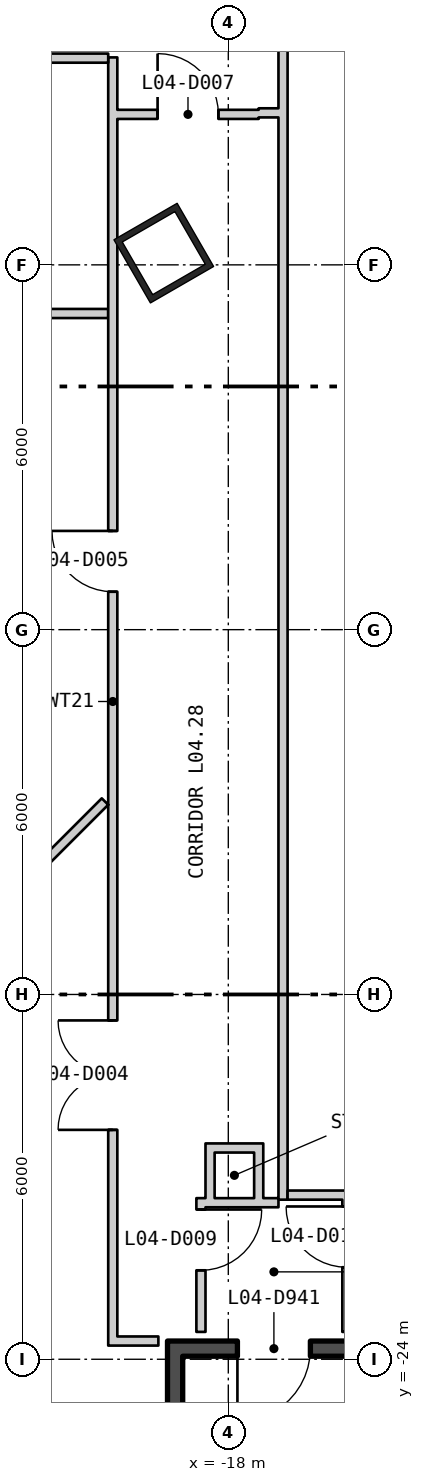
"""IFC4 building model, lengths in metres.
Left out: names, types, materials, properties, quantities, classifications, styles, units other than length and angle.
Written with IfcOpenShell. Run it as: python <this file> out.ifc"""

import sys

from ifc_helpers import new_model, si_unit, direction, frame, frame_2d, origin, origin_2d, place, context, subcontext, project, spatial, rectangle, hollow_rectangle, extrude, element, fill, save


model = new_model("IFC4")
c1 = context("Model", 3, precision=1e-05, world=origin(), true_north=direction((0.0, 1.0)))
c2 = subcontext(c1, "Body", "Model", "MODEL_VIEW")
j1 = project(units=[si_unit("LENGTHUNIT", "METRE"), si_unit("PLANEANGLEUNIT", "RADIAN")], contexts=[c1])
p1 = place(None, origin())
s1 = spatial("IfcSite", under=j1, at=p1, CompositionType="ELEMENT")
p2 = place(p1, origin())
s2 = spatial("IfcBuilding", under=s1, at=p2, CompositionType="ELEMENT")
p3 = place(p2, frame((0.0, 0.0, 23.7)))
s3 = spatial("IfcBuildingStorey", under=s2, at=p3, CompositionType="ELEMENT", Elevation=23.7)
p4 = place(p3, frame((-19.061, -5.807, 0.0), z_axis=(0.0, 0.0, 1.0), x_axis=(0.5, -0.866025403784, 0.0)))
e1 = element("IfcColumn", 1, at=p4, inside=s3, PredefinedType="COLUMN", context=c2, shape_type="SweptSolid", body=[
    extrude(hollow_rectangle(XDim=1.2, YDim=1.2, WallThickness=0.1, at=origin_2d()), origin(), (0.0, 0.0, 1.0), 5.1),
])
p5 = place(p3, frame((-18.875, -31.25, 0.0), z_axis=(0.0, 0.0, 1.0), x_axis=(0.0, 1.0, 0.0)))
e2 = element("IfcWall", 2, at=p5, inside=s3, PredefinedType="SHEAR", context=c2, shape_type="SweptSolid", body=[
    extrude(rectangle(XDim=7.3, YDim=0.25, at=frame_2d((3.65, 0.0))), origin(), (0.0, 0.0, 1.0), 4.85),
])
p6 = place(p3, frame((-19.0, -23.825, 0.0), z_axis=(0.0, 0.0, 1.0), x_axis=(1.0, 0.0, 0.0)))
e3 = element("IfcWall", 3, at=p6, inside=s3, PredefinedType="SHEAR", context=c2, shape_type="SweptSolid", body=[
    extrude(rectangle(XDim=3.5, YDim=0.25, at=frame_2d((1.75, 0.0))), origin(), (0.0, 0.0, 1.0), 4.85),
])
p7 = place(p6, frame((1.15, 0.0, 0.0)))
e4 = element("IfcOpeningElement", 4, at=p7, cuts=e3, PredefinedType="OPENING", context=c2, shape_type="SweptSolid", body=[
    extrude(rectangle(XDim=1.2, YDim=2.1, at=frame_2d((0.6, 1.05))), frame((0.0, 0.135, 0.0), z_axis=(0.0, -1.0, 0.0), x_axis=(1.0, 0.0, 0.0)), (0.0, 0.0, 1.0), 0.27),
])
p8 = place(p3, frame((-25.467, -6.8, 0.0), z_axis=(0.0, 0.0, 1.0), x_axis=(1.0, 0.0, 0.0)))
e5 = element("IfcWall", 5, at=p8, inside=s3, PredefinedType="PARTITIONING", context=c2, shape_type="SweptSolid", body=[
    extrude(rectangle(XDim=5.492, YDim=0.15, at=frame_2d((2.746, 0.0))), origin(), (0.0, 0.0, 1.0), 4.16),
])
p9 = place(p3, frame((-25.026, -19.825, 0.0), z_axis=(0.0, 0.0, 1.0), x_axis=(0.707106781187, 0.707106781187, 0.0)))
e6 = element("IfcWall", 6, at=p9, inside=s3, PredefinedType="PARTITIONING", context=c2, shape_type="SweptSolid", body=[
    extrude(rectangle(XDim=7.068, YDim=0.15, at=frame_2d((3.534, 0.0))), origin(), (0.0, 0.0, 1.0), 4.85),
])
p10 = place(p3, frame((-23.65, -2.6, 0.0), z_axis=(0.0, 0.0, 1.0), x_axis=(1.0, 0.0, 0.0)))
e7 = element("IfcWall", 7, at=p10, inside=s3, PredefinedType="PARTITIONING", context=c2, shape_type="SweptSolid", body=[
    extrude(rectangle(XDim=3.675, YDim=0.15, at=frame_2d((1.837, 0.0))), origin(), (0.0, 0.0, 1.0), 4.85),
])
p11 = place(p10, frame((1.312, 0.0, 0.0)))
e8 = element("IfcOpeningElement", 8, at=p11, cuts=e7, PredefinedType="OPENING", context=c2, shape_type="SweptSolid", body=[
    extrude(rectangle(XDim=1.0, YDim=2.1, at=frame_2d((0.5, 1.05))), frame((0.0, 0.085, 0.0), z_axis=(0.0, -1.0, 0.0), x_axis=(1.0, 0.0, 0.0)), (0.0, 0.0, 1.0), 0.17),
])
p12 = place(p3, frame((-19.9, -23.775, 0.0), z_axis=(0.0, 0.0, 1.0), x_axis=(0.0, 1.0, 0.0)))
e9 = element("IfcWall", 9, at=p12, inside=s3, PredefinedType="PARTITIONING", context=c2, shape_type="SweptSolid", body=[
    extrude(rectangle(XDim=21.187, YDim=0.15, at=frame_2d((10.594, 0.0))), origin(), (0.0, 0.0, 1.0), 4.85),
])
p13 = place(p12, frame((3.548, 0.0, 0.0)))
e10 = element("IfcOpeningElement", 10, at=p13, cuts=e9, PredefinedType="OPENING", context=c2, shape_type="SweptSolid", body=[
    extrude(rectangle(XDim=1.8, YDim=2.1, at=frame_2d((0.9, 1.05))), frame((0.0, 0.085, 0.0), z_axis=(0.0, -1.0, 0.0), x_axis=(1.0, 0.0, 0.0)), (0.0, 0.0, 1.0), 0.17),
])
p14 = place(p12, frame((12.399, 0.0, 0.0)))
e11 = element("IfcOpeningElement", 11, at=p14, cuts=e9, PredefinedType="OPENING", context=c2, shape_type="SweptSolid", body=[
    extrude(rectangle(XDim=1.0, YDim=2.1, at=frame_2d((0.5, 1.05))), frame((0.0, 0.085, 0.0), z_axis=(0.0, -1.0, 0.0), x_axis=(1.0, 0.0, 0.0)), (0.0, 0.0, 1.0), 0.17),
])
p15 = place(p3, frame((-19.825, -23.7, 0.0), z_axis=(0.0, 0.0, 1.0), x_axis=(1.0, 0.0, 0.0)))
e12 = element("IfcWall", 12, at=p15, inside=s3, PredefinedType="PARTITIONING", context=c2, shape_type="SweptSolid", body=[
    extrude(rectangle(XDim=0.675, YDim=0.15, at=frame_2d((0.338, 0.0))), origin(), (0.0, 0.0, 1.0), 4.85),
])
p16 = place(p3, frame((-19.825, -3.525, 0.0), z_axis=(0.0, 0.0, 1.0), x_axis=(1.0, 0.0, 0.0)))
e13 = element("IfcWall", 13, at=p16, inside=s3, PredefinedType="PARTITIONING", context=c2, shape_type="SweptSolid", body=[
    extrude(rectangle(XDim=2.325, YDim=0.15, at=frame_2d((1.163, 0.0))), origin(), (0.0, 0.0, 1.0), 4.85),
])
p17 = place(p16, frame((0.662, 0.0, 0.0)))
e14 = element("IfcOpeningElement", 14, at=p17, cuts=e13, PredefinedType="OPENING", context=c2, shape_type="SweptSolid", body=[
    extrude(rectangle(XDim=1.0, YDim=2.1, at=frame_2d((0.5, 1.05))), frame((0.0, 0.085, 0.0), z_axis=(0.0, -1.0, 0.0), x_axis=(1.0, 0.0, 0.0)), (0.0, 0.0, 1.0), 0.17),
])
p18 = place(p3, frame((-18.45, -23.55, 0.0), z_axis=(0.0, 0.0, 1.0), x_axis=(0.0, 1.0, 0.0)))
e15 = element("IfcWall", 15, at=p18, inside=s3, PredefinedType="PARTITIONING", context=c2, shape_type="SweptSolid", body=[
    extrude(rectangle(XDim=2.2, YDim=0.15, at=frame_2d((1.1, 0.0))), origin(), (0.0, 0.0, 1.0), 4.85),
])
p19 = place(p18, frame((1.013, 0.0, 0.0)))
e16 = element("IfcOpeningElement", 16, at=p19, cuts=e15, PredefinedType="OPENING", context=c2, shape_type="SweptSolid", body=[
    extrude(rectangle(XDim=1.0, YDim=2.1, at=frame_2d((0.5, 1.05))), frame((0.0, 0.085, 0.0), z_axis=(0.0, -1.0, 0.0), x_axis=(1.0, 0.0, 0.0)), (0.0, 0.0, 1.0), 0.17),
])
p20 = place(p3, frame((-18.3, -21.5, 0.0), z_axis=(0.0, 0.0, 1.0), x_axis=(0.0, 1.0, 0.0)))
e17 = element("IfcWall", 17, at=p20, inside=s3, PredefinedType="PARTITIONING", context=c2, shape_type="SweptSolid", body=[
    extrude(rectangle(XDim=1.05, YDim=0.15, at=frame_2d((0.525, 0.0))), origin(), (0.0, 0.0, 1.0), 4.85),
])
for number, where, z_axis, x_axis in (
    (18, (-18.225, -21.425, 0.0), (0.0, 0.0, 1.0), (1.0, 0.0, 0.0)),
    (19, (-18.225, -20.525, 0.0), (0.0, 0.0, 1.0), (1.0, 0.0, 0.0)),
):
    element("IfcWall", number, at=place(p3, frame(where, z_axis=z_axis, x_axis=x_axis)), inside=s3, PredefinedType="PARTITIONING", context=c2, shape_type="SweptSolid", body=[
        extrude(rectangle(XDim=0.65, YDim=0.15, at=frame_2d((0.325, 0.0))), origin(), (0.0, 0.0, 1.0), 4.85),
    ])
p21 = place(p3, frame((-17.5, -21.5, 0.0), z_axis=(0.0, 0.0, 1.0), x_axis=(0.0, 1.0, 0.0)))
e20 = element("IfcWall", 20, at=p21, inside=s3, PredefinedType="PARTITIONING", context=c2, shape_type="SweptSolid", body=[
    extrude(rectangle(XDim=1.05, YDim=0.15, at=frame_2d((0.525, 0.0))), origin(), (0.0, 0.0, 1.0), 4.85),
])
p22 = place(p3, frame((-17.5, -3.5, 0.0), z_axis=(0.0, 0.0, 1.0), x_axis=(1.0, 0.0, 0.0)))
e21 = element("IfcWall", 21, at=p22, inside=s3, PredefinedType="PARTITIONING", context=c2, shape_type="SweptSolid", body=[
    extrude(rectangle(XDim=0.325, YDim=0.15, at=frame_2d((0.163, 0.0))), origin(), (0.0, 0.0, 1.0), 4.85),
])
p23 = place(p3, frame((-17.425, -21.425, 0.0), z_axis=(0.0, 0.0, 1.0), x_axis=(1.0, 0.0, 0.0)))
e22 = element("IfcWall", 22, at=p23, inside=s3, PredefinedType="PARTITIONING", context=c2, shape_type="SweptSolid", body=[
    extrude(rectangle(XDim=0.25, YDim=0.15, at=frame_2d((0.125, 0.0))), origin(), (0.0, 0.0, 1.0), 4.85),
])
p24 = place(p3, frame((-17.1, -21.375, 0.0), z_axis=(0.0, 0.0, 1.0), x_axis=(0.0, 1.0, 0.0)))
e23 = element("IfcWall", 23, at=p24, inside=s3, PredefinedType="PARTITIONING", context=c2, shape_type="SweptSolid", body=[
    extrude(rectangle(XDim=19.05, YDim=0.15, at=frame_2d((9.525, 0.0))), origin(), (0.0, 0.0, 1.0), 4.85),
])
p25 = place(p3, frame((-17.025, -21.3, 0.0), z_axis=(0.0, 0.0, 1.0), x_axis=(1.0, 0.0, 0.0)))
e24 = element("IfcWall", 24, at=p25, inside=s3, PredefinedType="PARTITIONING", context=c2, shape_type="SweptSolid", body=[
    extrude(rectangle(XDim=10.654, YDim=0.15, at=frame_2d((5.327, 0.0))), origin(), (0.0, 0.0, 1.0), 4.85),
])
p26 = place(p3, frame((-16.05, -23.55, 0.0), z_axis=(0.0, 0.0, 1.0), x_axis=(0.0, 1.0, 0.0)))
e25 = element("IfcWall", 25, at=p26, inside=s3, PredefinedType="PARTITIONING", context=c2, shape_type="SweptSolid", body=[
    extrude(rectangle(XDim=2.175, YDim=0.15, at=frame_2d((1.087, 0.0))), origin(), (0.0, 0.0, 1.0), 4.16),
])
p27 = place(p26, frame((1.063, 0.0, 0.0)))
e26 = element("IfcOpeningElement", 26, at=p27, cuts=e25, PredefinedType="OPENING", context=c2, shape_type="SweptSolid", body=[
    extrude(rectangle(XDim=1.0, YDim=2.1, at=frame_2d((0.5, 1.05))), frame((0.0, 0.085, 0.0), z_axis=(0.0, -1.0, 0.0), x_axis=(1.0, 0.0, 0.0)), (0.0, 0.0, 1.0), 0.17),
])
p28 = place(p7, origin())
e27 = element("IfcDoor", 27, at=p28, inside=s3, OperationType="SINGLE_SWING_LEFT", PredefinedType="DOOR", context=c2, shape_type="SweptSolid", body=[
    extrude(rectangle(XDim=1.2, YDim=2.1, at=frame_2d((0.6, 1.05))), frame((0.0, 0.025, 0.0), z_axis=(0.0, -1.0, 0.0), x_axis=(1.0, 0.0, 0.0)), (0.0, 0.0, 1.0), 0.05),
])
fill(e4, e27)
p29 = place(p13, origin())
e28 = element("IfcDoor", 28, at=p29, inside=s3, OperationType="DOUBLE_DOOR_SINGLE_SWING", PredefinedType="DOOR", context=c2, shape_type="SweptSolid", body=[
    extrude(rectangle(XDim=1.8, YDim=2.1, at=frame_2d((0.9, 1.05))), frame((0.0, 0.025, 0.0), z_axis=(0.0, -1.0, 0.0), x_axis=(1.0, 0.0, 0.0)), (0.0, 0.0, 1.0), 0.05),
])
fill(e10, e28)
p30 = place(p14, origin())
e29 = element("IfcDoor", 29, at=p30, inside=s3, OperationType="SINGLE_SWING_LEFT", PredefinedType="DOOR", context=c2, shape_type="SweptSolid", body=[
    extrude(rectangle(XDim=1.0, YDim=2.1, at=frame_2d((0.5, 1.05))), frame((0.0, 0.025, 0.0), z_axis=(0.0, -1.0, 0.0), x_axis=(1.0, 0.0, 0.0)), (0.0, 0.0, 1.0), 0.05),
])
fill(e11, e29)
p31 = place(p17, origin())
e30 = element("IfcDoor", 30, at=p31, inside=s3, OperationType="SINGLE_SWING_RIGHT", PredefinedType="DOOR", context=c2, shape_type="SweptSolid", body=[
    extrude(rectangle(XDim=1.0, YDim=2.1, at=frame_2d((0.5, 1.05))), frame((0.0, 0.025, 0.0), z_axis=(0.0, -1.0, 0.0), x_axis=(1.0, 0.0, 0.0)), (0.0, 0.0, 1.0), 0.05),
])
fill(e14, e30)
p32 = place(p19, origin())
e31 = element("IfcDoor", 31, at=p32, inside=s3, OperationType="SINGLE_SWING_RIGHT", PredefinedType="DOOR", context=c2, shape_type="SweptSolid", body=[
    extrude(rectangle(XDim=1.0, YDim=2.1, at=frame_2d((0.5, 1.05))), frame((0.0, 0.025, 0.0), z_axis=(0.0, -1.0, 0.0), x_axis=(1.0, 0.0, 0.0)), (0.0, 0.0, 1.0), 0.05),
])
fill(e16, e31)
save(model, sys.argv[1])
